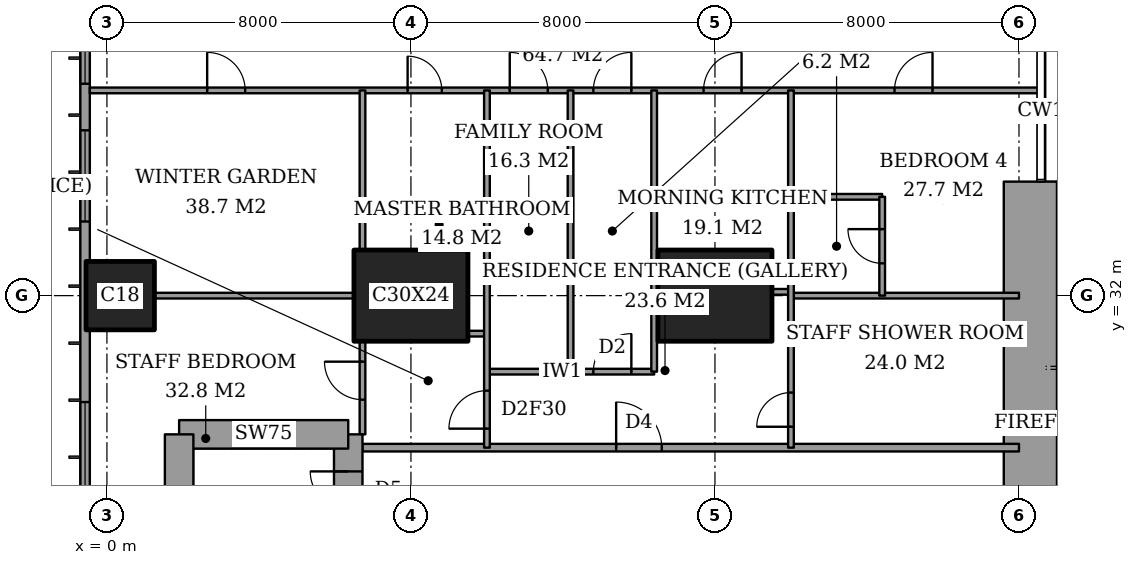
"""IFC4 building model, lengths in metres.
Left out: names, types, materials, properties, quantities, classifications, styles, units other than length and angle.
Written with IfcOpenShell. Run it as: python <this file> out.ifc"""

import sys

from ifc_helpers import new_model, si_unit, direction, frame, frame_2d, origin, origin_2d, place, context, subcontext, project, spatial, rectangle, extrude, element, fill, save


model = new_model("IFC4")
c1 = context("Model", 3, precision=1e-05, world=origin(), true_north=direction((0.0, 1.0)))
c2 = subcontext(c1, "Body", "Model", "MODEL_VIEW")
j1 = project(units=[si_unit("LENGTHUNIT", "METRE"), si_unit("PLANEANGLEUNIT", "RADIAN")], contexts=[c1])
p1 = place(None, origin())
s1 = spatial("IfcSite", under=j1, at=p1, CompositionType="ELEMENT")
p2 = place(p1, origin())
s2 = spatial("IfcBuilding", under=s1, at=p2, CompositionType="ELEMENT")
p3 = place(p2, frame((0.0, 0.0, 189.4)))
s3 = spatial("IfcBuildingStorey", under=s2, at=p3, CompositionType="ELEMENT", Elevation=189.4)
p4 = place(p3, frame((0.35, 32.0, 0.0), z_axis=(0.0, 0.0, 1.0), x_axis=(1.0, 0.0, 0.0)))
e1 = element("IfcColumn", 1, at=p4, inside=s3, PredefinedType="COLUMN", context=c2, shape_type="SweptSolid", body=[
    extrude(rectangle(XDim=1.8, YDim=1.8, at=origin_2d()), origin(), (0.0, 0.0, 1.0), 3.6),
])
for number, where, z_axis, x_axis in (
    (2, (8.0, 32.0, 0.0), (0.0, 0.0, 1.0), (1.0, 0.0, 0.0)),
    (3, (16.0, 32.0, 0.0), (0.0, 0.0, 1.0), (1.0, 0.0, 0.0)),
):
    element("IfcColumn", number, at=place(p3, frame(where, z_axis=z_axis, x_axis=x_axis)), inside=s3, PredefinedType="COLUMN", context=c2, shape_type="SweptSolid", body=[
        extrude(rectangle(XDim=3.0, YDim=2.4, at=origin_2d()), origin(), (0.0, 0.0, 1.0), 3.6),
    ])
p5 = place(p3, frame((24.3, 23.15, 0.0), z_axis=(0.0, 0.0, 1.0), x_axis=(0.0, 1.0, 0.0)))
e4 = element("IfcWall", 4, at=p5, inside=s3, PredefinedType="SHEAR", context=c2, shape_type="SweptSolid", body=[
    extrude(rectangle(XDim=11.85, YDim=1.4, at=frame_2d((5.925, 0.0))), origin(), (0.0, 0.0, 1.0), 3.6),
])
p6 = place(p5, frame((0.75, 0.0, 0.0)))
e5 = element("IfcOpeningElement", 5, at=p6, cuts=e4, PredefinedType="OPENING", context=c2, shape_type="SweptSolid", body=[
    extrude(rectangle(XDim=1.8, YDim=2.4, at=frame_2d((0.9, 1.2))), frame((0.0, 0.71, 0.0), z_axis=(0.0, -1.0, 0.0), x_axis=(1.0, 0.0, 0.0)), (0.0, 0.0, 1.0), 1.42),
])
p7 = place(p3, frame((6.35, 19.65, 0.0), z_axis=(0.0, 0.0, 1.0), x_axis=(0.0, 1.0, 0.0)))
e6 = element("IfcWall", 6, at=p7, inside=s3, PredefinedType="SHEAR", context=c2, shape_type="SweptSolid", body=[
    extrude(rectangle(XDim=8.7, YDim=0.75, at=frame_2d((4.35, 0.0))), origin(), (0.0, 0.0, 1.0), 3.6),
])
p8 = place(p7, frame((6.725, 0.0, 0.0)))
e7 = element("IfcOpeningElement", 7, at=p8, cuts=e6, PredefinedType="OPENING", context=c2, shape_type="SweptSolid", body=[
    extrude(rectangle(XDim=1.0, YDim=2.1, at=frame_2d((0.5, 1.05))), frame((0.0, 0.385, 0.0), z_axis=(0.0, -1.0, 0.0), x_axis=(1.0, 0.0, 0.0)), (0.0, 0.0, 1.0), 0.77),
])
p9 = place(p3, frame((6.35, 28.35, 0.0), z_axis=(0.0, 0.0, 1.0), x_axis=(-1.0, 0.0, 0.0)))
e8 = element("IfcWall", 8, at=p9, inside=s3, PredefinedType="SHEAR", context=c2, shape_type="SweptSolid", body=[
    extrude(rectangle(XDim=4.45, YDim=0.75, at=frame_2d((2.225, 0.0))), origin(), (0.0, 0.0, 1.0), 3.6),
])
p10 = place(p3, frame((1.9, 28.35, 0.0), z_axis=(0.0, 0.0, 1.0), x_axis=(0.0, -1.0, 0.0)))
e9 = element("IfcWall", 9, at=p10, inside=s3, PredefinedType="SHEAR", context=c2, shape_type="SweptSolid", body=[
    extrude(rectangle(XDim=8.7, YDim=0.75, at=frame_2d((4.35, 0.0))), origin(), (0.0, 0.0, 1.0), 3.6),
])
p11 = place(p3, frame((-0.575, 44.825, 0.0), z_axis=(0.0, 0.0, 1.0), x_axis=(0.0, -1.0, 0.0)))
e10 = element("IfcWall", 10, at=p11, inside=s3, PredefinedType="SOLIDWALL", context=c2, shape_type="SweptSolid", body=[
    extrude(rectangle(XDim=41.65, YDim=0.25, at=frame_2d((20.825, 0.0))), origin(), (0.0, 0.0, 1.0), 3.6),
])
p12 = place(p11, frame((0.825, 0.0, 0.2)))
e11 = element("IfcOpeningElement", 11, at=p12, cuts=e10, PredefinedType="OPENING", context=c2, shape_type="SweptSolid", body=[
    extrude(rectangle(XDim=2.4, YDim=2.4, at=frame_2d((1.2, 1.2))), frame((0.0, 0.135, 0.0), z_axis=(0.0, -1.0, 0.0), x_axis=(1.0, 0.0, 0.0)), (0.0, 0.0, 1.0), 0.27),
])
p13 = place(p11, frame((6.05, 0.0, 0.2)))
e12 = element("IfcOpeningElement", 12, at=p13, cuts=e10, PredefinedType="OPENING", context=c2, shape_type="SweptSolid", body=[
    extrude(rectangle(XDim=1.2, YDim=2.4, at=frame_2d((0.6, 1.2))), frame((0.0, 0.135, 0.0), z_axis=(0.0, -1.0, 0.0), x_axis=(1.0, 0.0, 0.0)), (0.0, 0.0, 1.0), 0.27),
])
p14 = place(p11, frame((8.475, 0.0, 0.2)))
e13 = element("IfcOpeningElement", 13, at=p14, cuts=e10, PredefinedType="OPENING", context=c2, shape_type="SweptSolid", body=[
    extrude(rectangle(XDim=2.4, YDim=2.4, at=frame_2d((1.2, 1.2))), frame((0.0, 0.135, 0.0), z_axis=(0.0, -1.0, 0.0), x_axis=(1.0, 0.0, 0.0)), (0.0, 0.0, 1.0), 0.27),
])
p15 = place(p11, frame((15.625, 0.0, 0.2)))
e14 = element("IfcOpeningElement", 14, at=p15, cuts=e10, PredefinedType="OPENING", context=c2, shape_type="SweptSolid", body=[
    extrude(rectangle(XDim=2.4, YDim=2.4, at=frame_2d((1.2, 1.2))), frame((0.0, 0.135, 0.0), z_axis=(0.0, -1.0, 0.0), x_axis=(1.0, 0.0, 0.0)), (0.0, 0.0, 1.0), 0.27),
])
p16 = place(p11, frame((23.625, 0.0, 0.2)))
e15 = element("IfcOpeningElement", 15, at=p16, cuts=e10, PredefinedType="OPENING", context=c2, shape_type="SweptSolid", body=[
    extrude(rectangle(XDim=2.4, YDim=2.4, at=frame_2d((1.2, 1.2))), frame((0.0, 0.135, 0.0), z_axis=(0.0, -1.0, 0.0), x_axis=(1.0, 0.0, 0.0)), (0.0, 0.0, 1.0), 0.27),
])
p17 = place(p11, frame((30.775, 0.0, 0.2)))
e16 = element("IfcOpeningElement", 16, at=p17, cuts=e10, PredefinedType="OPENING", context=c2, shape_type="SweptSolid", body=[
    extrude(rectangle(XDim=2.4, YDim=2.4, at=frame_2d((1.2, 1.2))), frame((0.0, 0.135, 0.0), z_axis=(0.0, -1.0, 0.0), x_axis=(1.0, 0.0, 0.0)), (0.0, 0.0, 1.0), 0.27),
])
p18 = place(p11, frame((34.55, 0.0, 0.2)))
e17 = element("IfcOpeningElement", 17, at=p18, cuts=e10, PredefinedType="OPENING", context=c2, shape_type="SweptSolid", body=[
    extrude(rectangle(XDim=1.2, YDim=2.4, at=frame_2d((0.6, 1.2))), frame((0.0, 0.135, 0.0), z_axis=(0.0, -1.0, 0.0), x_axis=(1.0, 0.0, 0.0)), (0.0, 0.0, 1.0), 0.27),
])
p19 = place(p11, frame((38.425, 0.0, 0.2)))
e18 = element("IfcOpeningElement", 18, at=p19, cuts=e10, PredefinedType="OPENING", context=c2, shape_type="SweptSolid", body=[
    extrude(rectangle(XDim=2.4, YDim=2.4, at=frame_2d((1.2, 1.2))), frame((0.0, 0.135, 0.0), z_axis=(0.0, -1.0, 0.0), x_axis=(1.0, 0.0, 0.0)), (0.0, 0.0, 1.0), 0.27),
])
p20 = place(p3, frame((6.725, 28.0, 0.0), z_axis=(0.0, 0.0, 1.0), x_axis=(1.0, 0.0, 0.0)))
e19 = element("IfcWall", 19, at=p20, inside=s3, PredefinedType="PARTITIONING", context=c2, shape_type="SweptSolid", body=[
    extrude(rectangle(XDim=17.275, YDim=0.2, at=frame_2d((8.637, 0.0))), origin(), (0.0, 0.0, 1.0), 3.35),
])
p21 = place(p20, frame((6.675, 0.0, 0.0)))
e20 = element("IfcOpeningElement", 20, at=p21, cuts=e19, PredefinedType="OPENING", context=c2, shape_type="SweptSolid", body=[
    extrude(rectangle(XDim=1.2, YDim=2.4, at=frame_2d((0.6, 1.2))), frame((0.0, 0.11, 0.0), z_axis=(0.0, -1.0, 0.0), x_axis=(1.0, 0.0, 0.0)), (0.0, 0.0, 1.0), 0.22),
])
p22 = place(p3, frame((10.0, 30.0, 0.0), z_axis=(0.0, 0.0, 1.0), x_axis=(1.0, 0.0, 0.0)))
e21 = element("IfcWall", 21, at=p22, inside=s3, PredefinedType="PARTITIONING", context=c2, shape_type="SweptSolid", body=[
    extrude(rectangle(XDim=4.4, YDim=0.15, at=frame_2d((2.2, 0.0))), origin(), (0.0, 0.0, 1.0), 3.35),
])
p23 = place(p22, frame((2.8, 0.0, 0.0)))
e22 = element("IfcOpeningElement", 22, at=p23, cuts=e21, PredefinedType="OPENING", context=c2, shape_type="SweptSolid", body=[
    extrude(rectangle(XDim=1.0, YDim=2.1, at=frame_2d((0.5, 1.05))), frame((0.0, 0.085, 0.0), z_axis=(0.0, -1.0, 0.0), x_axis=(1.0, 0.0, 0.0)), (0.0, 0.0, 1.0), 0.17),
])
p24 = place(p3, frame((9.5, 31.0, 0.0), z_axis=(0.0, 0.0, 1.0), x_axis=(1.0, 0.0, 0.0)))
e23 = element("IfcWall", 23, at=p24, inside=s3, PredefinedType="PARTITIONING", context=c2, shape_type="SweptSolid", body=[
    extrude(rectangle(XDim=0.5, YDim=0.15, at=frame_2d((0.25, 0.0))), origin(), (0.0, 0.0, 1.0), 3.35),
])
p25 = place(p3, frame((1.25, 32.0, 0.0), z_axis=(0.0, 0.0, 1.0), x_axis=(1.0, 0.0, 0.0)))
e24 = element("IfcWall", 24, at=p25, inside=s3, PredefinedType="PARTITIONING", context=c2, shape_type="SweptSolid", body=[
    extrude(rectangle(XDim=5.25, YDim=0.15, at=frame_2d((2.625, 0.0))), origin(), (0.0, 0.0, 1.0), 2.634),
])
p26 = place(p3, frame((18.0, 32.0, 0.0), z_axis=(0.0, 0.0, 1.0), x_axis=(1.0, 0.0, 0.0)))
e25 = element("IfcWall", 25, at=p26, inside=s3, PredefinedType="PARTITIONING", context=c2, shape_type="SweptSolid", body=[
    extrude(rectangle(XDim=6.0, YDim=0.15, at=frame_2d((3.0, 0.0))), origin(), (0.0, 0.0, 1.0), 2.634),
])
p27 = place(p3, frame((17.5, 32.1, 0.0), z_axis=(0.0, 0.0, 1.0), x_axis=(1.0, 0.0, 0.0)))
e26 = element("IfcWall", 26, at=p27, inside=s3, PredefinedType="PARTITIONING", context=c2, shape_type="SweptSolid", body=[
    extrude(rectangle(XDim=0.5, YDim=0.15, at=frame_2d((0.25, 0.0))), origin(), (0.0, 0.0, 1.0), 2.634),
])
p28 = place(p3, frame((18.0, 34.6, 0.0), z_axis=(0.0, 0.0, 1.0), x_axis=(1.0, 0.0, 0.0)))
e27 = element("IfcWall", 27, at=p28, inside=s3, PredefinedType="PARTITIONING", context=c2, shape_type="SweptSolid", body=[
    extrude(rectangle(XDim=2.4, YDim=0.15, at=frame_2d((1.2, 0.0))), origin(), (0.0, 0.0, 1.0), 3.35),
])
p29 = place(p3, frame((-0.45, 37.4, 0.0), z_axis=(0.0, 0.0, 1.0), x_axis=(1.0, 0.0, 0.0)))
e28 = element("IfcWall", 28, at=p29, inside=s3, PredefinedType="PARTITIONING", context=c2, shape_type="SweptSolid", body=[
    extrude(rectangle(XDim=25.011, YDim=0.15, at=frame_2d((12.505, 0.0))), origin(), (0.0, 0.0, 1.0), 3.35),
])
p30 = place(p29, frame((13.25, 0.0, 0.0)))
e29 = element("IfcOpeningElement", 29, at=p30, cuts=e28, PredefinedType="OPENING", context=c2, shape_type="SweptSolid", body=[
    extrude(rectangle(XDim=1.0, YDim=2.1, at=frame_2d((0.5, 1.05))), frame((0.0, 0.085, 0.0), z_axis=(0.0, -1.0, 0.0), x_axis=(1.0, 0.0, 0.0)), (0.0, 0.0, 1.0), 0.17),
])
p31 = place(p29, frame((3.087, 0.0, 0.0)))
e30 = element("IfcOpeningElement", 30, at=p31, cuts=e28, PredefinedType="OPENING", context=c2, shape_type="SweptSolid", body=[
    extrude(rectangle(XDim=1.0, YDim=2.1, at=frame_2d((0.5, 1.05))), frame((0.0, 0.085, 0.0), z_axis=(0.0, -1.0, 0.0), x_axis=(1.0, 0.0, 0.0)), (0.0, 0.0, 1.0), 0.17),
])
p32 = place(p29, frame((8.363, 0.0, 0.0)))
e31 = element("IfcOpeningElement", 31, at=p32, cuts=e28, PredefinedType="OPENING", context=c2, shape_type="SweptSolid", body=[
    extrude(rectangle(XDim=0.9, YDim=2.1, at=frame_2d((0.45, 1.05))), frame((0.0, 0.085, 0.0), z_axis=(0.0, -1.0, 0.0), x_axis=(1.0, 0.0, 0.0)), (0.0, 0.0, 1.0), 0.17),
])
p33 = place(p29, frame((11.05, 0.0, 0.0)))
e32 = element("IfcOpeningElement", 32, at=p33, cuts=e28, PredefinedType="OPENING", context=c2, shape_type="SweptSolid", body=[
    extrude(rectangle(XDim=1.0, YDim=2.1, at=frame_2d((0.5, 1.05))), frame((0.0, 0.085, 0.0), z_axis=(0.0, -1.0, 0.0), x_axis=(1.0, 0.0, 0.0)), (0.0, 0.0, 1.0), 0.17),
])
p34 = place(p29, frame((16.15, 0.0, 0.0)))
e33 = element("IfcOpeningElement", 33, at=p34, cuts=e28, PredefinedType="OPENING", context=c2, shape_type="SweptSolid", body=[
    extrude(rectangle(XDim=1.0, YDim=2.1, at=frame_2d((0.5, 1.05))), frame((0.0, 0.085, 0.0), z_axis=(0.0, -1.0, 0.0), x_axis=(1.0, 0.0, 0.0)), (0.0, 0.0, 1.0), 0.17),
])
p35 = place(p29, frame((21.175, 0.0, 0.0)))
e34 = element("IfcOpeningElement", 34, at=p35, cuts=e28, PredefinedType="OPENING", context=c2, shape_type="SweptSolid", body=[
    extrude(rectangle(XDim=1.0, YDim=2.1, at=frame_2d((0.5, 1.05))), frame((0.0, 0.085, 0.0), z_axis=(0.0, -1.0, 0.0), x_axis=(1.0, 0.0, 0.0)), (0.0, 0.0, 1.0), 0.17),
])
p36 = place(p3, frame((6.725, 28.35, 0.0), z_axis=(0.0, 0.0, 1.0), x_axis=(0.0, 1.0, 0.0)))
e35 = element("IfcWall", 35, at=p36, inside=s3, PredefinedType="PARTITIONING", context=c2, shape_type="SweptSolid", body=[
    extrude(rectangle(XDim=2.45, YDim=0.15, at=frame_2d((1.225, 0.0))), origin(), (0.0, 0.0, 1.0), 3.35),
])
p37 = place(p36, frame((0.913, 0.0, 0.0)))
e36 = element("IfcOpeningElement", 36, at=p37, cuts=e35, PredefinedType="OPENING", context=c2, shape_type="SweptSolid", body=[
    extrude(rectangle(XDim=1.0, YDim=2.1, at=frame_2d((0.5, 1.05))), frame((0.0, 0.085, 0.0), z_axis=(0.0, -1.0, 0.0), x_axis=(1.0, 0.0, 0.0)), (0.0, 0.0, 1.0), 0.17),
])
p38 = place(p3, frame((6.725, 33.2, 0.0), z_axis=(0.0, 0.0, 1.0), x_axis=(0.0, 1.0, 0.0)))
e37 = element("IfcWall", 37, at=p38, inside=s3, PredefinedType="PARTITIONING", context=c2, shape_type="SweptSolid", body=[
    extrude(rectangle(XDim=4.2, YDim=0.15, at=frame_2d((2.1, 0.0))), origin(), (0.0, 0.0, 1.0), 3.35),
])
p39 = place(p3, frame((10.0, 28.0, 0.0), z_axis=(0.0, 0.0, 1.0), x_axis=(0.0, 1.0, 0.0)))
e38 = element("IfcWall", 38, at=p39, inside=s3, PredefinedType="PARTITIONING", context=c2, shape_type="SweptSolid", body=[
    extrude(rectangle(XDim=9.4, YDim=0.15, at=frame_2d((4.7, 0.0))), origin(), (0.0, 0.0, 1.0), 3.35),
])
p40 = place(p39, frame((0.5, 0.0, 0.0)))
e39 = element("IfcOpeningElement", 39, at=p40, cuts=e38, PredefinedType="OPENING", context=c2, shape_type="SweptSolid", body=[
    extrude(rectangle(XDim=1.0, YDim=2.1, at=frame_2d((0.5, 1.05))), frame((0.0, 0.085, 0.0), z_axis=(0.0, -1.0, 0.0), x_axis=(1.0, 0.0, 0.0)), (0.0, 0.0, 1.0), 0.17),
])
for number, where, z_axis, x_axis in (
    (40, (12.2, 30.0, 0.0), (0.0, 0.0, 1.0), (0.0, 1.0, 0.0)),
    (41, (14.4, 30.0, 0.0), (0.0, 0.0, 1.0), (0.0, 1.0, 0.0)),
):
    element("IfcWall", number, at=place(p3, frame(where, z_axis=z_axis, x_axis=x_axis)), inside=s3, PredefinedType="PARTITIONING", context=c2, shape_type="SweptSolid", body=[
        extrude(rectangle(XDim=7.4, YDim=0.15, at=frame_2d((3.7, 0.0))), origin(), (0.0, 0.0, 1.0), 3.35),
    ])
p41 = place(p3, frame((18.0, 28.0, 0.0), z_axis=(0.0, 0.0, 1.0), x_axis=(0.0, 1.0, 0.0)))
e42 = element("IfcWall", 42, at=p41, inside=s3, PredefinedType="PARTITIONING", context=c2, shape_type="SweptSolid", body=[
    extrude(rectangle(XDim=9.4, YDim=0.15, at=frame_2d((4.7, 0.0))), origin(), (0.0, 0.0, 1.0), 3.35),
])
p42 = place(p41, frame((0.55, 0.0, 0.0)))
e43 = element("IfcOpeningElement", 43, at=p42, cuts=e42, PredefinedType="OPENING", context=c2, shape_type="SweptSolid", body=[
    extrude(rectangle(XDim=0.9, YDim=2.1, at=frame_2d((0.45, 1.05))), frame((0.0, 0.085, 0.0), z_axis=(0.0, -1.0, 0.0), x_axis=(1.0, 0.0, 0.0)), (0.0, 0.0, 1.0), 0.17),
])
p43 = place(p3, frame((20.4, 32.0, 0.0), z_axis=(0.0, 0.0, 1.0), x_axis=(0.0, 1.0, 0.0)))
e44 = element("IfcWall", 44, at=p43, inside=s3, PredefinedType="PARTITIONING", context=c2, shape_type="SweptSolid", body=[
    extrude(rectangle(XDim=2.6, YDim=0.15, at=frame_2d((1.3, 0.0))), origin(), (0.0, 0.0, 1.0), 3.35),
])
p44 = place(p43, frame((0.85, 0.0, 0.0)))
e45 = element("IfcOpeningElement", 45, at=p44, cuts=e44, PredefinedType="OPENING", context=c2, shape_type="SweptSolid", body=[
    extrude(rectangle(XDim=0.9, YDim=2.1, at=frame_2d((0.45, 1.05))), frame((0.0, 0.085, 0.0), z_axis=(0.0, -1.0, 0.0), x_axis=(1.0, 0.0, 0.0)), (0.0, 0.0, 1.0), 0.17),
])
p45 = place(p13, origin())
e46 = element("IfcWindow", 46, at=p45, inside=s3, PartitioningType="SINGLE_PANEL", PredefinedType="WINDOW", context=c2, shape_type="SweptSolid", body=[
    extrude(rectangle(XDim=1.2, YDim=2.4, at=frame_2d((0.6, 1.2))), frame((0.0, 0.03, 0.0), z_axis=(0.0, -1.0, 0.0), x_axis=(1.0, 0.0, 0.0)), (0.0, 0.0, 1.0), 0.06),
])
fill(e12, e46)
p46 = place(p14, origin())
e47 = element("IfcWindow", 47, at=p46, inside=s3, PartitioningType="SINGLE_PANEL", PredefinedType="WINDOW", context=c2, shape_type="SweptSolid", body=[
    extrude(rectangle(XDim=2.4, YDim=2.4, at=frame_2d((1.2, 1.2))), frame((0.0, 0.03, 0.0), z_axis=(0.0, -1.0, 0.0), x_axis=(1.0, 0.0, 0.0)), (0.0, 0.0, 1.0), 0.06),
])
fill(e13, e47)
p47 = place(p15, origin())
e48 = element("IfcWindow", 48, at=p47, inside=s3, PartitioningType="SINGLE_PANEL", PredefinedType="WINDOW", context=c2, shape_type="SweptSolid", body=[
    extrude(rectangle(XDim=2.4, YDim=2.4, at=frame_2d((1.2, 1.2))), frame((0.0, 0.03, 0.0), z_axis=(0.0, -1.0, 0.0), x_axis=(1.0, 0.0, 0.0)), (0.0, 0.0, 1.0), 0.06),
])
fill(e14, e48)
p48 = place(p30, origin())
e49 = element("IfcDoor", 49, at=p48, inside=s3, OperationType="SINGLE_SWING_LEFT", PredefinedType="DOOR", context=c2, shape_type="SweptSolid", body=[
    extrude(rectangle(XDim=1.0, YDim=2.1, at=frame_2d((0.5, 1.05))), frame((0.0, 0.025, 0.0), z_axis=(0.0, -1.0, 0.0), x_axis=(1.0, 0.0, 0.0)), (0.0, 0.0, 1.0), 0.05),
])
fill(e29, e49)
p49 = place(p31, origin())
e50 = element("IfcDoor", 50, at=p49, inside=s3, OperationType="SINGLE_SWING_RIGHT", PredefinedType="DOOR", context=c2, shape_type="SweptSolid", body=[
    extrude(rectangle(XDim=1.0, YDim=2.1, at=frame_2d((0.5, 1.05))), frame((0.0, 0.025, 0.0), z_axis=(0.0, -1.0, 0.0), x_axis=(1.0, 0.0, 0.0)), (0.0, 0.0, 1.0), 0.05),
])
fill(e30, e50)
p50 = place(p37, origin())
e51 = element("IfcDoor", 51, at=p50, inside=s3, OperationType="SINGLE_SWING_LEFT", PredefinedType="DOOR", context=c2, shape_type="SweptSolid", body=[
    extrude(rectangle(XDim=1.0, YDim=2.1, at=frame_2d((0.5, 1.05))), frame((0.0, 0.025, 0.0), z_axis=(0.0, -1.0, 0.0), x_axis=(1.0, 0.0, 0.0)), (0.0, 0.0, 1.0), 0.05),
])
fill(e36, e51)
p51 = place(p32, origin())
e52 = element("IfcDoor", 52, at=p51, inside=s3, OperationType="SINGLE_SWING_RIGHT", PredefinedType="DOOR", context=c2, shape_type="SweptSolid", body=[
    extrude(rectangle(XDim=0.9, YDim=2.1, at=frame_2d((0.45, 1.05))), frame((0.0, 0.025, 0.0), z_axis=(0.0, -1.0, 0.0), x_axis=(1.0, 0.0, 0.0)), (0.0, 0.0, 1.0), 0.05),
])
fill(e31, e52)
p52 = place(p40, origin())
e53 = element("IfcDoor", 53, at=p52, inside=s3, OperationType="SINGLE_SWING_RIGHT", PredefinedType="DOOR", context=c2, shape_type="SweptSolid", body=[
    extrude(rectangle(XDim=1.0, YDim=2.1, at=frame_2d((0.5, 1.05))), frame((0.0, 0.025, 0.0), z_axis=(0.0, -1.0, 0.0), x_axis=(1.0, 0.0, 0.0)), (0.0, 0.0, 1.0), 0.05),
])
fill(e39, e53)
p53 = place(p21, origin())
e54 = element("IfcDoor", 54, at=p53, inside=s3, OperationType="SINGLE_SWING_RIGHT", PredefinedType="DOOR", context=c2, shape_type="SweptSolid", body=[
    extrude(rectangle(XDim=1.2, YDim=2.4, at=frame_2d((0.6, 1.2))), frame((0.0, 0.025, 0.0), z_axis=(0.0, -1.0, 0.0), x_axis=(1.0, 0.0, 0.0)), (0.0, 0.0, 1.0), 0.05),
])
fill(e20, e54)
p54 = place(p33, origin())
e55 = element("IfcDoor", 55, at=p54, inside=s3, OperationType="SINGLE_SWING_RIGHT", PredefinedType="DOOR", context=c2, shape_type="SweptSolid", body=[
    extrude(rectangle(XDim=1.0, YDim=2.1, at=frame_2d((0.5, 1.05))), frame((0.0, 0.025, 0.0), z_axis=(0.0, -1.0, 0.0), x_axis=(1.0, 0.0, 0.0)), (0.0, 0.0, 1.0), 0.05),
])
fill(e32, e55)
p55 = place(p23, origin())
e56 = element("IfcDoor", 56, at=p55, inside=s3, OperationType="SINGLE_SWING_LEFT", PredefinedType="DOOR", context=c2, shape_type="SweptSolid", body=[
    extrude(rectangle(XDim=1.0, YDim=2.1, at=frame_2d((0.5, 1.05))), frame((0.0, 0.025, 0.0), z_axis=(0.0, -1.0, 0.0), x_axis=(1.0, 0.0, 0.0)), (0.0, 0.0, 1.0), 0.05),
])
fill(e22, e56)
p56 = place(p34, origin())
e57 = element("IfcDoor", 57, at=p56, inside=s3, OperationType="SINGLE_SWING_LEFT", PredefinedType="DOOR", context=c2, shape_type="SweptSolid", body=[
    extrude(rectangle(XDim=1.0, YDim=2.1, at=frame_2d((0.5, 1.05))), frame((0.0, 0.025, 0.0), z_axis=(0.0, -1.0, 0.0), x_axis=(1.0, 0.0, 0.0)), (0.0, 0.0, 1.0), 0.05),
])
fill(e33, e57)
p57 = place(p44, origin())
e58 = element("IfcDoor", 58, at=p57, inside=s3, OperationType="SINGLE_SWING_LEFT", PredefinedType="DOOR", context=c2, shape_type="SweptSolid", body=[
    extrude(rectangle(XDim=0.9, YDim=2.1, at=frame_2d((0.45, 1.05))), frame((0.0, 0.025, 0.0), z_axis=(0.0, -1.0, 0.0), x_axis=(1.0, 0.0, 0.0)), (0.0, 0.0, 1.0), 0.05),
])
fill(e45, e58)
p58 = place(p35, origin())
e59 = element("IfcDoor", 59, at=p58, inside=s3, OperationType="SINGLE_SWING_LEFT", PredefinedType="DOOR", context=c2, shape_type="SweptSolid", body=[
    extrude(rectangle(XDim=1.0, YDim=2.1, at=frame_2d((0.5, 1.05))), frame((0.0, 0.025, 0.0), z_axis=(0.0, -1.0, 0.0), x_axis=(1.0, 0.0, 0.0)), (0.0, 0.0, 1.0), 0.05),
])
fill(e34, e59)
p59 = place(p42, origin())
e60 = element("IfcDoor", 60, at=p59, inside=s3, OperationType="SINGLE_SWING_RIGHT", PredefinedType="DOOR", context=c2, shape_type="SweptSolid", body=[
    extrude(rectangle(XDim=0.9, YDim=2.1, at=frame_2d((0.45, 1.05))), frame((0.0, 0.025, 0.0), z_axis=(0.0, -1.0, 0.0), x_axis=(1.0, 0.0, 0.0)), (0.0, 0.0, 1.0), 0.05),
])
fill(e43, e60)
p60 = place(p8, origin())
e61 = element("IfcDoor", 61, at=p60, inside=s3, OperationType="SINGLE_SWING_LEFT", PredefinedType="DOOR", context=c2, shape_type="SweptSolid", body=[
    extrude(rectangle(XDim=1.0, YDim=2.1, at=frame_2d((0.5, 1.05))), frame((0.0, 0.025, 0.0), z_axis=(0.0, -1.0, 0.0), x_axis=(1.0, 0.0, 0.0)), (0.0, 0.0, 1.0), 0.05),
])
fill(e7, e61)
save(model, sys.argv[1])
